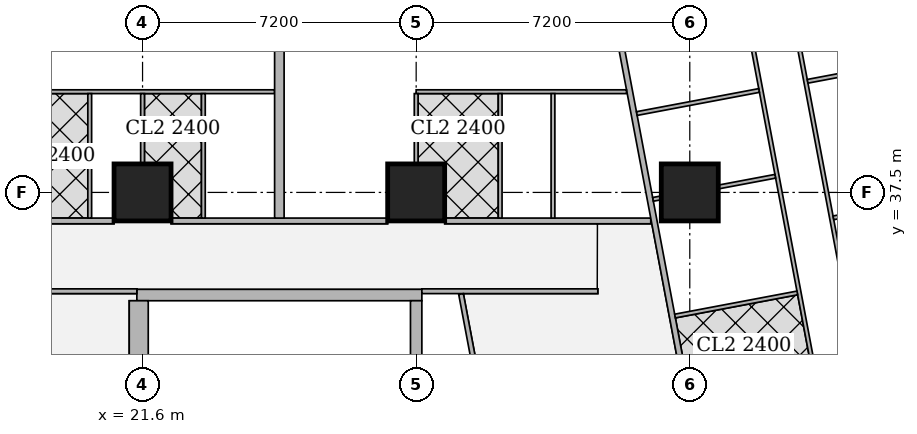
"""IFC4 building model, lengths in metres.
Left out: names, types, materials, properties, quantities, classifications, styles, units other than length and angle.
Written with IfcOpenShell. Run it as: python <this file> out.ifc"""

import sys

from ifc_helpers import new_model, si_unit, direction, frame, frame_2d, origin, origin_2d, place, context, subcontext, project, spatial, rectangle, extrude, element, fill, save


model = new_model("IFC4")
c1 = context("Model", 3, precision=1e-05, world=origin(), true_north=direction((0.0, 1.0)))
c2 = subcontext(c1, "Body", "Model", "MODEL_VIEW")
j1 = project(units=[si_unit("LENGTHUNIT", "METRE"), si_unit("PLANEANGLEUNIT", "RADIAN")], contexts=[c1])
p1 = place(None, origin())
s1 = spatial("IfcSite", under=j1, at=p1, CompositionType="ELEMENT")
p2 = place(p1, origin())
s2 = spatial("IfcBuilding", under=s1, at=p2, CompositionType="ELEMENT")
p3 = place(p2, frame((0.0, 0.0, 147.05)))
s3 = spatial("IfcBuildingStorey", under=s2, at=p3, CompositionType="ELEMENT", Elevation=147.05)
for number, where, z_axis, x_axis in (
    (1, (21.6, 37.5, 0.0), (0.0, 0.0, 1.0), (1.0, 0.0, 0.0)),
    (2, (28.8, 37.5, 0.0), (0.0, 0.0, 1.0), (1.0, 0.0, 0.0)),
    (3, (36.0, 37.5, 0.0), (0.0, 0.0, 1.0), (1.0, 0.0, 0.0)),
):
    element("IfcColumn", number, at=place(p3, frame(where, z_axis=z_axis, x_axis=x_axis)), inside=s3, PredefinedType="COLUMN", context=c2, shape_type="SweptSolid", body=[
        extrude(rectangle(XDim=1.5, YDim=1.5, at=origin_2d()), origin(), (0.0, 0.0, 1.0), 3.75),
    ])
p4 = place(p3, frame((21.45, 34.8, 0.0), z_axis=(0.0, 0.0, 1.0), x_axis=(1.0, 0.0, 0.0)))
e4 = element("IfcWall", 4, at=p4, inside=s3, PredefinedType="SHEAR", context=c2, shape_type="SweptSolid", body=[
    extrude(rectangle(XDim=7.5, YDim=0.3, at=frame_2d((3.75, 0.0))), origin(), (0.0, 0.0, 1.0), 3.75),
])
p5 = place(p4, frame((0.5, 0.0, 0.0)))
e5 = element("IfcOpeningElement", 5, at=p5, cuts=e4, PredefinedType="OPENING", context=c2, shape_type="SweptSolid", body=[
    extrude(rectangle(XDim=1.1, YDim=2.1, at=frame_2d((0.55, 1.05))), frame((0.0, 0.16, 0.0), z_axis=(0.0, -1.0, 0.0), x_axis=(1.0, 0.0, 0.0)), (0.0, 0.0, 1.0), 0.32),
])
p6 = place(p3, frame((21.5, 30.45, 0.0), z_axis=(0.0, 0.0, 1.0), x_axis=(0.0, 1.0, 0.0)))
e6 = element("IfcWall", 6, at=p6, inside=s3, PredefinedType="SHEAR", context=c2, shape_type="SweptSolid", body=[
    extrude(rectangle(XDim=4.2, YDim=0.5, at=frame_2d((2.1, 0.0))), origin(), (0.0, 0.0, 1.0), 3.75),
])
p7 = place(p3, frame((28.8, 30.45, 0.0), z_axis=(0.0, 0.0, 1.0), x_axis=(0.0, 1.0, 0.0)))
e7 = element("IfcWall", 7, at=p7, inside=s3, PredefinedType="SHEAR", context=c2, shape_type="SweptSolid", body=[
    extrude(rectangle(XDim=4.2, YDim=0.3, at=frame_2d((2.1, 0.0))), origin(), (0.0, 0.0, 1.0), 3.75),
])
p8 = place(p3, frame((15.151, 36.75, 0.0), z_axis=(0.0, 0.0, 1.0), x_axis=(1.0, 0.0, 0.0)))
e8 = element("IfcWall", 8, at=p8, inside=s3, PredefinedType="SOLIDWALL", context=c2, shape_type="SweptSolid", body=[
    extrude(rectangle(XDim=5.698, YDim=0.15, at=frame_2d((2.849, 0.0))), origin(), (0.0, 0.0, 1.0), 3.5),
])
p9 = place(p8, frame((0.749, 0.0, 0.0)))
e9 = element("IfcOpeningElement", 9, at=p9, cuts=e8, PredefinedType="OPENING", context=c2, shape_type="SweptSolid", body=[
    extrude(rectangle(XDim=1.0, YDim=2.1, at=frame_2d((0.5, 1.05))), frame((0.0, 0.085, 0.0), z_axis=(0.0, -1.0, 0.0), x_axis=(1.0, 0.0, 0.0)), (0.0, 0.0, 1.0), 0.17),
])
p10 = place(p3, frame((22.351, 36.75, 0.0), z_axis=(0.0, 0.0, 1.0), x_axis=(1.0, 0.0, 0.0)))
e10 = element("IfcWall", 10, at=p10, inside=s3, PredefinedType="SOLIDWALL", context=c2, shape_type="SweptSolid", body=[
    extrude(rectangle(XDim=5.698, YDim=0.15, at=frame_2d((2.849, 0.0))), origin(), (0.0, 0.0, 1.0), 3.5),
])
p11 = place(p10, frame((4.032, 0.0, 0.0)))
e11 = element("IfcOpeningElement", 11, at=p11, cuts=e10, PredefinedType="OPENING", context=c2, shape_type="SweptSolid", body=[
    extrude(rectangle(XDim=1.0, YDim=2.1, at=frame_2d((0.5, 1.05))), frame((0.0, 0.085, 0.0), z_axis=(0.0, -1.0, 0.0), x_axis=(1.0, 0.0, 0.0)), (0.0, 0.0, 1.0), 0.17),
])
p12 = place(p3, frame((29.551, 36.75, 0.0), z_axis=(0.0, 0.0, 1.0), x_axis=(1.0, 0.0, 0.0)))
e12 = element("IfcWall", 12, at=p12, inside=s3, PredefinedType="SOLIDWALL", context=c2, shape_type="SweptSolid", body=[
    extrude(rectangle(XDim=5.422, YDim=0.15, at=frame_2d((2.711, 0.0))), origin(), (0.0, 0.0, 1.0), 3.5),
])
p13 = place(p3, frame((33.877, 43.029, 0.0), z_axis=(0.0, 0.0, 1.0), x_axis=(0.185596841028, -0.98262597798, 0.0)))
e13 = element("IfcWall", 13, at=p13, inside=s3, PredefinedType="SOLIDWALL", context=c2, shape_type="SweptSolid", body=[
    extrude(rectangle(XDim=41.66, YDim=0.15, at=frame_2d((20.83, 0.0))), origin(), (0.0, 0.0, 1.0), 2.5),
])
p14 = place(p13, frame((12.57, 0.0, 0.0)))
e14 = element("IfcOpeningElement", 14, at=p14, cuts=e13, PredefinedType="OPENING", context=c2, shape_type="SweptSolid", body=[
    extrude(rectangle(XDim=1.0, YDim=2.1, at=frame_2d((0.5, 1.05))), frame((0.0, 0.085, 0.0), z_axis=(0.0, -1.0, 0.0), x_axis=(1.0, 0.0, 0.0)), (0.0, 0.0, 1.0), 0.17),
])
p15 = place(p13, frame((16.386, 0.0, 0.0)))
e15 = element("IfcOpeningElement", 15, at=p15, cuts=e13, PredefinedType="OPENING", context=c2, shape_type="SweptSolid", body=[
    extrude(rectangle(XDim=1.0, YDim=2.1, at=frame_2d((0.5, 1.05))), frame((0.0, 0.085, 0.0), z_axis=(0.0, -1.0, 0.0), x_axis=(1.0, 0.0, 0.0)), (0.0, 0.0, 1.0), 0.17),
])
p16 = place(p13, frame((31.166, 0.0, 0.0)))
e16 = element("IfcOpeningElement", 16, at=p16, cuts=e13, PredefinedType="OPENING", context=c2, shape_type="SweptSolid", body=[
    extrude(rectangle(XDim=1.0, YDim=2.1, at=frame_2d((0.5, 1.05))), frame((0.0, 0.085, 0.0), z_axis=(0.0, -1.0, 0.0), x_axis=(1.0, 0.0, 0.0)), (0.0, 0.0, 1.0), 0.17),
])
p17 = place(p3, frame((38.701, 42.27, 0.0), z_axis=(0.0, 0.0, 1.0), x_axis=(0.185634707842, -0.982618825, 0.0)))
e17 = element("IfcWall", 17, at=p17, inside=s3, PredefinedType="PARTITIONING", context=c2, shape_type="SweptSolid", body=[
    extrude(rectangle(XDim=9.47, YDim=0.1, at=frame_2d((4.735, 0.0))), origin(), (0.0, 0.0, 1.0), 3.5),
])
p18 = place(p17, frame((8.42, 0.0, 0.0)))
e18 = element("IfcOpeningElement", 18, at=p18, cuts=e17, PredefinedType="OPENING", context=c2, shape_type="SweptSolid", body=[
    extrude(rectangle(XDim=0.9, YDim=2.1, at=frame_2d((0.45, 1.05))), frame((0.0, 0.06, 0.0), z_axis=(0.0, -1.0, 0.0), x_axis=(1.0, 0.0, 0.0)), (0.0, 0.0, 1.0), 0.12),
])
p19 = place(p17, frame((4.444, 0.0, 0.0)))
e19 = element("IfcOpeningElement", 19, at=p19, cuts=e17, PredefinedType="OPENING", context=c2, shape_type="SweptSolid", body=[
    extrude(rectangle(XDim=0.9, YDim=2.1, at=frame_2d((0.45, 1.05))), frame((0.0, 0.06, 0.0), z_axis=(0.0, -1.0, 0.0), x_axis=(1.0, 0.0, 0.0)), (0.0, 0.0, 1.0), 0.12),
])
p20 = place(p3, frame((37.411, 42.638, 0.0), z_axis=(0.0, 0.0, 1.0), x_axis=(0.185485587071, -0.982646984928, 0.0)))
e20 = element("IfcWall", 20, at=p20, inside=s3, PredefinedType="PARTITIONING", context=c2, shape_type="SweptSolid", body=[
    extrude(rectangle(XDim=10.072, YDim=0.1, at=frame_2d((5.036, 0.0))), origin(), (0.0, 0.0, 1.0), 3.5),
])
p21 = place(p20, frame((8.567, 0.0, 0.0)))
e21 = element("IfcOpeningElement", 21, at=p21, cuts=e20, PredefinedType="OPENING", context=c2, shape_type="SweptSolid", body=[
    extrude(rectangle(XDim=0.9, YDim=2.1, at=frame_2d((0.45, 1.05))), frame((0.0, 0.06, 0.0), z_axis=(0.0, -1.0, 0.0), x_axis=(1.0, 0.0, 0.0)), (0.0, 0.0, 1.0), 0.12),
])
p22 = place(p20, frame((3.188, 0.0, 0.0)))
e22 = element("IfcOpeningElement", 22, at=p22, cuts=e20, PredefinedType="OPENING", context=c2, shape_type="SweptSolid", body=[
    extrude(rectangle(XDim=0.9, YDim=2.1, at=frame_2d((0.45, 1.05))), frame((0.0, 0.06, 0.0), z_axis=(0.0, -1.0, 0.0), x_axis=(1.0, 0.0, 0.0)), (0.0, 0.0, 1.0), 0.12),
])
p23 = place(p20, frame((1.129, 0.0, 0.0)))
e23 = element("IfcOpeningElement", 23, at=p23, cuts=e20, PredefinedType="OPENING", context=c2, shape_type="SweptSolid", body=[
    extrude(rectangle(XDim=0.9, YDim=2.1, at=frame_2d((0.45, 1.05))), frame((0.0, 0.06, 0.0), z_axis=(0.0, -1.0, 0.0), x_axis=(1.0, 0.0, 0.0)), (0.0, 0.0, 1.0), 0.12),
])
p24 = place(p20, frame((5.899, 0.0, 0.0)))
e24 = element("IfcOpeningElement", 24, at=p24, cuts=e20, PredefinedType="OPENING", context=c2, shape_type="SweptSolid", body=[
    extrude(rectangle(XDim=0.9, YDim=2.1, at=frame_2d((0.45, 1.05))), frame((0.0, 0.06, 0.0), z_axis=(0.0, -1.0, 0.0), x_axis=(1.0, 0.0, 0.0)), (0.0, 0.0, 1.0), 0.12),
])
p25 = place(p3, frame((43.277, 41.212, 0.0), z_axis=(0.0, 0.0, 1.0), x_axis=(-0.982665405803, -0.185387972203, 0.0)))
e25 = element("IfcWall", 25, at=p25, inside=s3, PredefinedType="PARTITIONING", context=c2, shape_type="SweptSolid", body=[
    extrude(rectangle(XDim=4.25, YDim=0.1, at=frame_2d((2.125, 0.0))), origin(), (0.0, 0.0, 1.0), 2.1),
])
p26 = place(p3, frame((41.154, 37.091, 0.0), z_axis=(0.0, 0.0, 1.0), x_axis=(-0.982586605669, -0.185805173125, 0.0)))
e26 = element("IfcWall", 26, at=p26, inside=s3, PredefinedType="PARTITIONING", context=c2, shape_type="SweptSolid", body=[
    extrude(rectangle(XDim=1.399, YDim=0.1, at=frame_2d((0.7, 0.0))), origin(), (0.0, 0.0, 1.0), 3.5),
])
p27 = place(p3, frame((37.823, 40.182, 0.0), z_axis=(0.0, 0.0, 1.0), x_axis=(-0.982664729897, -0.18539155487, 0.0)))
e27 = element("IfcWall", 27, at=p27, inside=s3, PredefinedType="PARTITIONING", context=c2, shape_type="SweptSolid", body=[
    extrude(rectangle(XDim=3.274, YDim=0.1, at=frame_2d((1.637, 0.0))), origin(), (0.0, 0.0, 1.0), 3.5),
])
p28 = place(p3, frame((38.25, 37.925, 0.0), z_axis=(0.0, 0.0, 1.0), x_axis=(-0.982676595259, -0.18532865167, 0.0)))
e28 = element("IfcWall", 28, at=p28, inside=s3, PredefinedType="PARTITIONING", context=c2, shape_type="SweptSolid", body=[
    extrude(rectangle(XDim=1.516, YDim=0.1, at=frame_2d((0.758, 0.0))), origin(), (0.0, 0.0, 1.0), 3.5),
])
p29 = place(p3, frame((35.24, 37.356, 0.0), z_axis=(0.0, 0.0, 1.0), x_axis=(-0.982819911474, -0.184567119526, 0.0)))
e29 = element("IfcWall", 29, at=p29, inside=s3, PredefinedType="PARTITIONING", context=c2, shape_type="SweptSolid", body=[
    extrude(rectangle(XDim=0.212, YDim=0.1, at=frame_2d((0.106, 0.0))), origin(), (0.0, 0.0, 1.0), 3.5),
])
p30 = place(p3, frame((38.829, 34.855, 0.0), z_axis=(0.0, 0.0, 1.0), x_axis=(-0.982610347627, -0.185679575441, 0.0)))
e30 = element("IfcWall", 30, at=p30, inside=s3, PredefinedType="PARTITIONING", context=c2, shape_type="SweptSolid", body=[
    extrude(rectangle(XDim=3.274, YDim=0.1, at=frame_2d((1.637, 0.0))), origin(), (0.0, 0.0, 1.0), 3.5),
])
p31 = place(p3, frame((18.0, 40.15, 0.0), z_axis=(0.0, 0.0, 1.0), x_axis=(1.0, 0.0, 0.0)))
e31 = element("IfcWall", 31, at=p31, inside=s3, PredefinedType="PARTITIONING", context=c2, shape_type="SweptSolid", body=[
    extrude(rectangle(XDim=7.075, YDim=0.1, at=frame_2d((3.538, 0.0))), origin(), (0.0, 0.0, 1.0), 3.5),
])
p32 = place(p31, frame((0.655, 0.0, 0.0)))
e32 = element("IfcOpeningElement", 32, at=p32, cuts=e31, PredefinedType="OPENING", context=c2, shape_type="SweptSolid", body=[
    extrude(rectangle(XDim=0.9, YDim=2.1, at=frame_2d((0.45, 1.05))), frame((0.0, 0.06, 0.0), z_axis=(0.0, -1.0, 0.0), x_axis=(1.0, 0.0, 0.0)), (0.0, 0.0, 1.0), 0.12),
])
p33 = place(p31, frame((3.95, 0.0, 0.0)))
e33 = element("IfcOpeningElement", 33, at=p33, cuts=e31, PredefinedType="OPENING", context=c2, shape_type="SweptSolid", body=[
    extrude(rectangle(XDim=0.9, YDim=2.1, at=frame_2d((0.45, 1.05))), frame((0.0, 0.06, 0.0), z_axis=(0.0, -1.0, 0.0), x_axis=(1.0, 0.0, 0.0)), (0.0, 0.0, 1.0), 0.12),
])
p34 = place(p31, frame((2.455, 0.0, 0.0)))
e34 = element("IfcOpeningElement", 34, at=p34, cuts=e31, PredefinedType="OPENING", context=c2, shape_type="SweptSolid", body=[
    extrude(rectangle(XDim=0.9, YDim=2.1, at=frame_2d((0.45, 1.05))), frame((0.0, 0.06, 0.0), z_axis=(0.0, -1.0, 0.0), x_axis=(1.0, 0.0, 0.0)), (0.0, 0.0, 1.0), 0.12),
])
p35 = place(p31, frame((5.75, 0.0, 0.0)))
e35 = element("IfcOpeningElement", 35, at=p35, cuts=e31, PredefinedType="OPENING", context=c2, shape_type="SweptSolid", body=[
    extrude(rectangle(XDim=0.9, YDim=2.1, at=frame_2d((0.45, 1.05))), frame((0.0, 0.06, 0.0), z_axis=(0.0, -1.0, 0.0), x_axis=(1.0, 0.0, 0.0)), (0.0, 0.0, 1.0), 0.12),
])
p36 = place(p3, frame((21.6, 38.251, 0.0), z_axis=(0.0, 0.0, 1.0), x_axis=(0.0, 1.0, 0.0)))
e36 = element("IfcWall", 36, at=p36, inside=s3, PredefinedType="PARTITIONING", context=c2, shape_type="SweptSolid", body=[
    extrude(rectangle(XDim=1.849, YDim=0.1, at=frame_2d((0.925, 0.0))), origin(), (0.0, 0.0, 1.0), 3.5),
])
for number, where, z_axis, x_axis in (
    (37, (20.21, 36.825, 0.0), (0.0, 0.0, 1.0), (0.0, 1.0, 0.0)),
    (38, (23.2, 36.825, 0.0), (0.0, 0.0, 1.0), (0.0, 1.0, 0.0)),
):
    element("IfcWall", number, at=place(p3, frame(where, z_axis=z_axis, x_axis=x_axis)), inside=s3, PredefinedType="PARTITIONING", context=c2, shape_type="SweptSolid", body=[
        extrude(rectangle(XDim=3.275, YDim=0.1, at=frame_2d((1.638, 0.0))), origin(), (0.0, 0.0, 1.0), 3.5),
    ])
p37 = place(p3, frame((28.8, 40.15, 0.0), z_axis=(0.0, 0.0, 1.0), x_axis=(1.0, 0.0, 0.0)))
e39 = element("IfcWall", 39, at=p37, inside=s3, PredefinedType="PARTITIONING", context=c2, shape_type="SweptSolid", body=[
    extrude(rectangle(XDim=5.535, YDim=0.1, at=frame_2d((2.768, 0.0))), origin(), (0.0, 0.0, 1.0), 3.5),
])
p38 = place(p37, frame((0.655, 0.0, 0.0)))
e40 = element("IfcOpeningElement", 40, at=p38, cuts=e39, PredefinedType="OPENING", context=c2, shape_type="SweptSolid", body=[
    extrude(rectangle(XDim=0.9, YDim=2.1, at=frame_2d((0.45, 1.05))), frame((0.0, 0.06, 0.0), z_axis=(0.0, -1.0, 0.0), x_axis=(1.0, 0.0, 0.0)), (0.0, 0.0, 1.0), 0.12),
])
p39 = place(p37, frame((4.481, 0.0, 0.0)))
e41 = element("IfcOpeningElement", 41, at=p39, cuts=e39, PredefinedType="OPENING", context=c2, shape_type="SweptSolid", body=[
    extrude(rectangle(XDim=0.9, YDim=2.1, at=frame_2d((0.45, 1.05))), frame((0.0, 0.06, 0.0), z_axis=(0.0, -1.0, 0.0), x_axis=(1.0, 0.0, 0.0)), (0.0, 0.0, 1.0), 0.12),
])
p40 = place(p37, frame((2.455, 0.0, 0.0)))
e42 = element("IfcOpeningElement", 42, at=p40, cuts=e39, PredefinedType="OPENING", context=c2, shape_type="SweptSolid", body=[
    extrude(rectangle(XDim=0.9, YDim=2.1, at=frame_2d((0.45, 1.05))), frame((0.0, 0.06, 0.0), z_axis=(0.0, -1.0, 0.0), x_axis=(1.0, 0.0, 0.0)), (0.0, 0.0, 1.0), 0.12),
])
p41 = place(p3, frame((28.8, 38.251, 0.0), z_axis=(0.0, 0.0, 1.0), x_axis=(0.0, 1.0, 0.0)))
e43 = element("IfcWall", 43, at=p41, inside=s3, PredefinedType="PARTITIONING", context=c2, shape_type="SweptSolid", body=[
    extrude(rectangle(XDim=1.849, YDim=0.1, at=frame_2d((0.925, 0.0))), origin(), (0.0, 0.0, 1.0), 3.5),
])
for number, where, z_axis, x_axis in (
    (44, (32.4, 36.825, 0.0), (0.0, 0.0, 1.0), (0.0, 1.0, 0.0)),
    (45, (31.01, 36.825, 0.0), (0.0, 0.0, 1.0), (0.0, 1.0, 0.0)),
):
    element("IfcWall", number, at=place(p3, frame(where, z_axis=z_axis, x_axis=x_axis)), inside=s3, PredefinedType="PARTITIONING", context=c2, shape_type="SweptSolid", body=[
        extrude(rectangle(XDim=3.275, YDim=0.1, at=frame_2d((1.638, 0.0))), origin(), (0.0, 0.0, 1.0), 3.5),
    ])
p42 = place(p3, frame((25.2, 36.825, 0.0), z_axis=(0.0, 0.0, 1.0), x_axis=(0.0, 1.0, 0.0)))
e46 = element("IfcWall", 46, at=p42, inside=s3, PredefinedType="SOLIDWALL", context=c2, shape_type="SweptSolid", body=[
    extrude(rectangle(XDim=4.525, YDim=0.25, at=frame_2d((2.263, 0.0))), origin(), (0.0, 0.0, 1.0), 3.5),
])
p43 = place(p3, frame((13.95, 34.9, 0.0), z_axis=(0.0, 0.0, 1.0), x_axis=(1.0, 0.0, 0.0)))
e47 = element("IfcWall", 47, at=p43, inside=s3, PredefinedType="PARTITIONING", context=c2, shape_type="SweptSolid", body=[
    extrude(rectangle(XDim=7.5, YDim=0.125, at=frame_2d((3.75, 0.0))), origin(), (0.0, 0.0, 1.0), 3.5),
])
p44 = place(p43, frame((3.95, 0.0, 0.0)))
e48 = element("IfcOpeningElement", 48, at=p44, cuts=e47, PredefinedType="OPENING", context=c2, shape_type="SweptSolid", body=[
    extrude(rectangle(XDim=1.8, YDim=2.1, at=frame_2d((0.9, 1.05))), frame((0.0, 0.073, 0.0), z_axis=(0.0, -1.0, 0.0), x_axis=(1.0, 0.0, 0.0)), (0.0, 0.0, 1.0), 0.145),
])
p45 = place(p3, frame((28.95, 34.9, 0.0), z_axis=(0.0, 0.0, 1.0), x_axis=(1.0, 0.0, 0.0)))
e49 = element("IfcWall", 49, at=p45, inside=s3, PredefinedType="PARTITIONING", context=c2, shape_type="SweptSolid", body=[
    extrude(rectangle(XDim=4.63, YDim=0.125, at=frame_2d((2.315, 0.0))), origin(), (0.0, 0.0, 1.0), 3.5),
])
p46 = place(p3, frame((32.188, 23.141, 0.0), z_axis=(0.0, 0.0, 1.0), x_axis=(-0.185598625075, 0.98262564101, 0.0)))
e50 = element("IfcWall", 50, at=p46, inside=s3, PredefinedType="PARTITIONING", context=c2, shape_type="SweptSolid", body=[
    extrude(rectangle(XDim=11.891, YDim=0.125, at=frame_2d((5.946, 0.0))), origin(), (0.0, 0.0, 1.0), 3.5),
])
p47 = place(p46, frame((0.171, 0.0, 0.0)))
e51 = element("IfcOpeningElement", 51, at=p47, cuts=e50, PredefinedType="OPENING", context=c2, shape_type="SweptSolid", body=[
    extrude(rectangle(XDim=1.0, YDim=2.1, at=frame_2d((0.5, 1.05))), frame((0.0, 0.073, 0.0), z_axis=(0.0, -1.0, 0.0), x_axis=(1.0, 0.0, 0.0)), (0.0, 0.0, 1.0), 0.145),
])
p48 = place(p46, frame((3.987, 0.0, 0.0)))
e52 = element("IfcOpeningElement", 52, at=p48, cuts=e50, PredefinedType="OPENING", context=c2, shape_type="SweptSolid", body=[
    extrude(rectangle(XDim=1.0, YDim=2.1, at=frame_2d((0.5, 1.05))), frame((0.0, 0.073, 0.0), z_axis=(0.0, -1.0, 0.0), x_axis=(1.0, 0.0, 0.0)), (0.0, 0.0, 1.0), 0.145),
])
p49 = place(p46, frame((7.803, 0.0, 0.0)))
e53 = element("IfcOpeningElement", 53, at=p49, cuts=e50, PredefinedType="OPENING", context=c2, shape_type="SweptSolid", body=[
    extrude(rectangle(XDim=1.0, YDim=2.1, at=frame_2d((0.5, 1.05))), frame((0.0, 0.073, 0.0), z_axis=(0.0, -1.0, 0.0), x_axis=(1.0, 0.0, 0.0)), (0.0, 0.0, 1.0), 0.145),
])
p50 = place(p19, origin())
e54 = element("IfcDoor", 54, at=p50, inside=s3, OperationType="SINGLE_SWING_RIGHT", PredefinedType="DOOR", context=c2, shape_type="SweptSolid", body=[
    extrude(rectangle(XDim=0.9, YDim=2.1, at=frame_2d((0.45, 1.05))), frame((0.0, 0.025, 0.0), z_axis=(0.0, -1.0, 0.0), x_axis=(1.0, 0.0, 0.0)), (0.0, 0.0, 1.0), 0.05),
])
fill(e19, e54)
p51 = place(p21, origin())
e55 = element("IfcDoor", 55, at=p51, inside=s3, OperationType="SINGLE_SWING_LEFT", PredefinedType="DOOR", context=c2, shape_type="SweptSolid", body=[
    extrude(rectangle(XDim=0.9, YDim=2.1, at=frame_2d((0.45, 1.05))), frame((0.0, 0.025, 0.0), z_axis=(0.0, -1.0, 0.0), x_axis=(1.0, 0.0, 0.0)), (0.0, 0.0, 1.0), 0.05),
])
fill(e21, e55)
p52 = place(p22, origin())
e56 = element("IfcDoor", 56, at=p52, inside=s3, OperationType="SINGLE_SWING_RIGHT", PredefinedType="DOOR", context=c2, shape_type="SweptSolid", body=[
    extrude(rectangle(XDim=0.9, YDim=2.1, at=frame_2d((0.45, 1.05))), frame((0.0, 0.025, 0.0), z_axis=(0.0, -1.0, 0.0), x_axis=(1.0, 0.0, 0.0)), (0.0, 0.0, 1.0), 0.05),
])
fill(e22, e56)
p53 = place(p23, origin())
e57 = element("IfcDoor", 57, at=p53, inside=s3, OperationType="SINGLE_SWING_RIGHT", PredefinedType="DOOR", context=c2, shape_type="SweptSolid", body=[
    extrude(rectangle(XDim=0.9, YDim=2.1, at=frame_2d((0.45, 1.05))), frame((0.0, 0.025, 0.0), z_axis=(0.0, -1.0, 0.0), x_axis=(1.0, 0.0, 0.0)), (0.0, 0.0, 1.0), 0.05),
])
fill(e23, e57)
p54 = place(p24, origin())
e58 = element("IfcDoor", 58, at=p54, inside=s3, OperationType="SINGLE_SWING_LEFT", PredefinedType="DOOR", context=c2, shape_type="SweptSolid", body=[
    extrude(rectangle(XDim=0.9, YDim=2.1, at=frame_2d((0.45, 1.05))), frame((0.0, 0.025, 0.0), z_axis=(0.0, -1.0, 0.0), x_axis=(1.0, 0.0, 0.0)), (0.0, 0.0, 1.0), 0.05),
])
fill(e24, e58)
p55 = place(p32, origin())
e59 = element("IfcDoor", 59, at=p55, inside=s3, OperationType="SINGLE_SWING_RIGHT", PredefinedType="DOOR", context=c2, shape_type="SweptSolid", body=[
    extrude(rectangle(XDim=0.9, YDim=2.1, at=frame_2d((0.45, 1.05))), frame((0.0, 0.025, 0.0), z_axis=(0.0, -1.0, 0.0), x_axis=(1.0, 0.0, 0.0)), (0.0, 0.0, 1.0), 0.05),
])
fill(e32, e59)
p56 = place(p33, origin())
e60 = element("IfcDoor", 60, at=p56, inside=s3, OperationType="SINGLE_SWING_RIGHT", PredefinedType="DOOR", context=c2, shape_type="SweptSolid", body=[
    extrude(rectangle(XDim=0.9, YDim=2.1, at=frame_2d((0.45, 1.05))), frame((0.0, 0.025, 0.0), z_axis=(0.0, -1.0, 0.0), x_axis=(1.0, 0.0, 0.0)), (0.0, 0.0, 1.0), 0.05),
])
fill(e33, e60)
p57 = place(p34, origin())
e61 = element("IfcDoor", 61, at=p57, inside=s3, OperationType="SINGLE_SWING_RIGHT", PredefinedType="DOOR", context=c2, shape_type="SweptSolid", body=[
    extrude(rectangle(XDim=0.9, YDim=2.1, at=frame_2d((0.45, 1.05))), frame((0.0, 0.025, 0.0), z_axis=(0.0, -1.0, 0.0), x_axis=(1.0, 0.0, 0.0)), (0.0, 0.0, 1.0), 0.05),
])
fill(e34, e61)
p58 = place(p35, origin())
e62 = element("IfcDoor", 62, at=p58, inside=s3, OperationType="SINGLE_SWING_LEFT", PredefinedType="DOOR", context=c2, shape_type="SweptSolid", body=[
    extrude(rectangle(XDim=0.9, YDim=2.1, at=frame_2d((0.45, 1.05))), frame((0.0, 0.025, 0.0), z_axis=(0.0, -1.0, 0.0), x_axis=(1.0, 0.0, 0.0)), (0.0, 0.0, 1.0), 0.05),
])
fill(e35, e62)
p59 = place(p38, origin())
e63 = element("IfcDoor", 63, at=p59, inside=s3, OperationType="SINGLE_SWING_RIGHT", PredefinedType="DOOR", context=c2, shape_type="SweptSolid", body=[
    extrude(rectangle(XDim=0.9, YDim=2.1, at=frame_2d((0.45, 1.05))), frame((0.0, 0.025, 0.0), z_axis=(0.0, -1.0, 0.0), x_axis=(1.0, 0.0, 0.0)), (0.0, 0.0, 1.0), 0.05),
])
fill(e40, e63)
p60 = place(p39, origin())
e64 = element("IfcDoor", 64, at=p60, inside=s3, OperationType="SINGLE_SWING_LEFT", PredefinedType="DOOR", context=c2, shape_type="SweptSolid", body=[
    extrude(rectangle(XDim=0.9, YDim=2.1, at=frame_2d((0.45, 1.05))), frame((0.0, 0.025, 0.0), z_axis=(0.0, -1.0, 0.0), x_axis=(1.0, 0.0, 0.0)), (0.0, 0.0, 1.0), 0.05),
])
fill(e41, e64)
p61 = place(p40, origin())
e65 = element("IfcDoor", 65, at=p61, inside=s3, OperationType="SINGLE_SWING_RIGHT", PredefinedType="DOOR", context=c2, shape_type="SweptSolid", body=[
    extrude(rectangle(XDim=0.9, YDim=2.1, at=frame_2d((0.45, 1.05))), frame((0.0, 0.025, 0.0), z_axis=(0.0, -1.0, 0.0), x_axis=(1.0, 0.0, 0.0)), (0.0, 0.0, 1.0), 0.05),
])
fill(e42, e65)
p62 = place(p11, origin())
e66 = element("IfcDoor", 66, at=p62, inside=s3, OperationType="SINGLE_SWING_RIGHT", PredefinedType="DOOR", context=c2, shape_type="SweptSolid", body=[
    extrude(rectangle(XDim=1.0, YDim=2.1, at=frame_2d((0.5, 1.05))), frame((0.0, 0.025, 0.0), z_axis=(0.0, -1.0, 0.0), x_axis=(1.0, 0.0, 0.0)), (0.0, 0.0, 1.0), 0.05),
])
fill(e11, e66)
p63 = place(p44, origin())
e67 = element("IfcDoor", 67, at=p63, inside=s3, OperationType="DOUBLE_DOOR_SINGLE_SWING", PredefinedType="DOOR", context=c2, shape_type="SweptSolid", body=[
    extrude(rectangle(XDim=1.8, YDim=2.1, at=frame_2d((0.9, 1.05))), frame((0.0, 0.025, 0.0), z_axis=(0.0, -1.0, 0.0), x_axis=(1.0, 0.0, 0.0)), (0.0, 0.0, 1.0), 0.05),
])
fill(e48, e67)
p64 = place(p5, origin())
e68 = element("IfcDoor", 68, at=p64, inside=s3, OperationType="SINGLE_SWING_RIGHT", PredefinedType="DOOR", context=c2, shape_type="SweptSolid", body=[
    extrude(rectangle(XDim=1.1, YDim=2.1, at=frame_2d((0.55, 1.05))), frame((0.0, 0.025, 0.0), z_axis=(0.0, -1.0, 0.0), x_axis=(1.0, 0.0, 0.0)), (0.0, 0.0, 1.0), 0.05),
])
fill(e5, e68)
save(model, sys.argv[1])
